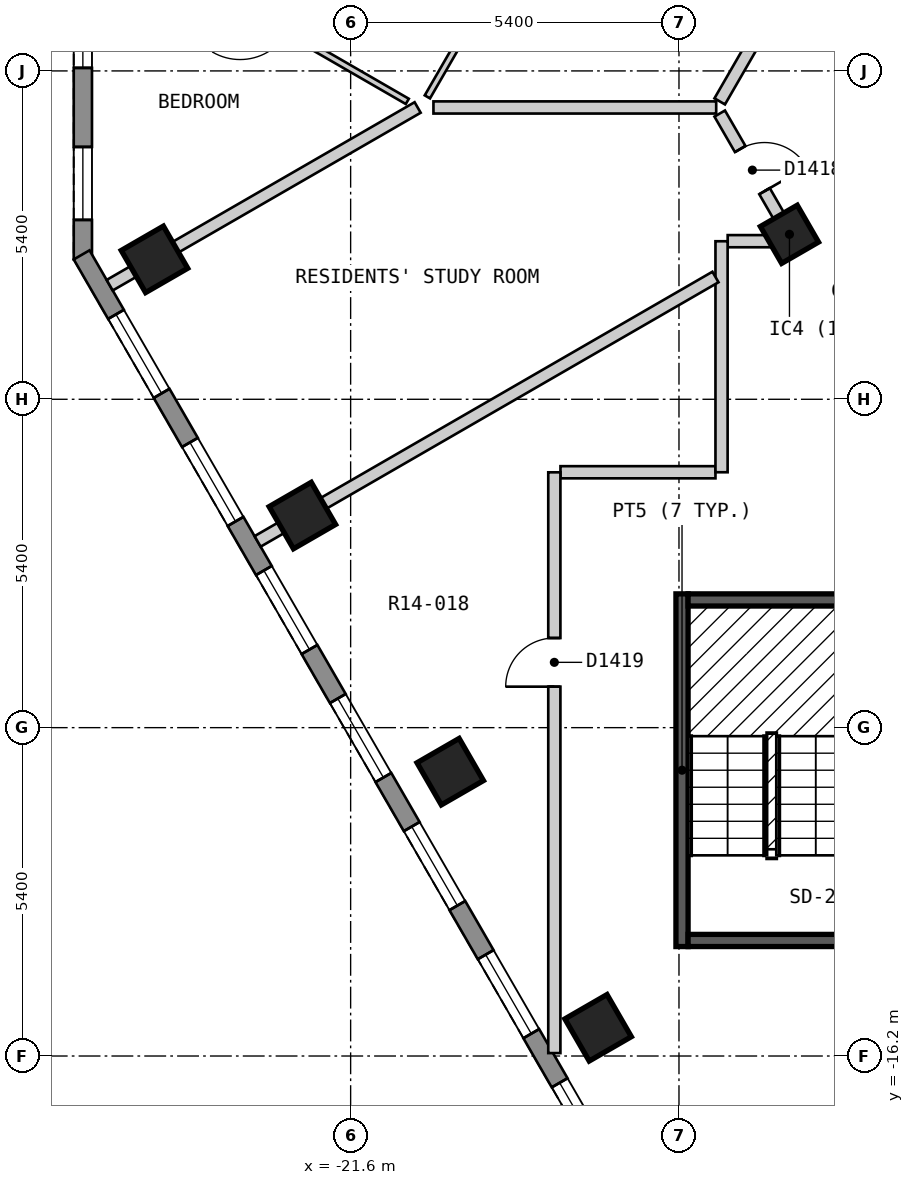
"""IFC4 building model, lengths in metres.
Left out: names, types, materials, properties, quantities, classifications, styles, units other than length and angle.
Written with IfcOpenShell. Run it as: python <this file> out.ifc"""

import sys

from ifc_helpers import new_model, si_unit, direction, frame, frame_2d, origin, origin_2d, place, context, subcontext, project, spatial, polyline, rectangle, outline, extrude, element, fill, save


model = new_model("IFC4")
c1 = context("Model", 3, precision=1e-05, world=origin(), true_north=direction((0.0, 1.0)))
c2 = subcontext(c1, "Body", "Model", "MODEL_VIEW")
j1 = project(units=[si_unit("LENGTHUNIT", "METRE"), si_unit("PLANEANGLEUNIT", "RADIAN")], contexts=[c1])
p1 = place(None, origin())
s1 = spatial("IfcSite", under=j1, at=p1, CompositionType="ELEMENT")
p2 = place(p1, origin())
s2 = spatial("IfcBuilding", under=s1, at=p2, CompositionType="ELEMENT")
p3 = place(p2, frame((0.0, 0.0, 178.2)))
s3 = spatial("IfcBuildingStorey", under=s2, at=p3, CompositionType="ELEMENT", Elevation=178.2)
for number, where, z_axis, x_axis in (
    (1, (-24.826, -3.099, 0.0), (0.0, 0.0, 1.0), (0.5, -0.866, 0.0)),
    (2, (-22.394, -7.312, 0.0), (0.0, 0.0, 1.0), (0.5, -0.866, 0.0)),
    (3, (-19.962, -11.524, 0.0), (0.0, 0.0, 1.0), (0.5, -0.866, 0.0)),
    (4, (-17.53, -15.736, 0.0), (0.0, 0.0, 1.0), (0.5, -0.866, 0.0)),
):
    element("IfcColumn", number, at=place(p3, frame(where, z_axis=z_axis, x_axis=x_axis)), inside=s3, PredefinedType="COLUMN", context=c2, shape_type="SweptSolid", body=[
        extrude(rectangle(XDim=0.8, YDim=0.8, at=origin_2d()), origin(), (0.0, 0.0, 1.0), 3.0),
    ])
p4 = place(p3, frame((-14.383, -2.687, 0.0), z_axis=(0.0, 0.0, 1.0), x_axis=(0.5, -0.866025403784, 0.0)))
e5 = element("IfcColumn", 5, at=p4, inside=s3, PredefinedType="COLUMN", context=c2, shape_type="SweptSolid", body=[
    extrude(rectangle(XDim=0.7, YDim=0.7, at=origin_2d()), origin(), (0.0, 0.0, 1.0), 3.0),
])
p5 = place(p3, frame((-26.004, 1.9, 0.0), z_axis=(0.0, 0.0, 1.0), x_axis=(0.0, -1.0, 0.0)))
e6 = element("IfcWall", 6, at=p5, inside=s3, PredefinedType="SOLIDWALL", context=c2, shape_type="SweptSolid", body=[
    extrude(outline(polyline([(0.0, -0.15), (5.0, -0.15), (4.92, 0.15), (0.08, 0.15), (0.0, -0.15)])), origin(), (0.0, 0.0, 1.0), 2.7),
])
p6 = place(p5, frame((0.65, 0.0, 0.15)))
e7 = element("IfcOpeningElement", 7, at=p6, cuts=e6, PredefinedType="OPENING", context=c2, shape_type="SweptSolid", body=[
    extrude(rectangle(XDim=1.2, YDim=2.1, at=frame_2d((0.6, 1.05))), frame((0.0, 0.16, 0.0), z_axis=(0.0, -1.0, 0.0), x_axis=(1.0, 0.0, 0.0)), (0.0, 0.0, 1.0), 0.32),
])
p7 = place(p5, frame((3.15, 0.0, 0.15)))
e8 = element("IfcOpeningElement", 8, at=p7, cuts=e6, PredefinedType="OPENING", context=c2, shape_type="SweptSolid", body=[
    extrude(rectangle(XDim=1.2, YDim=2.1, at=frame_2d((0.6, 1.05))), frame((0.0, 0.16, 0.0), z_axis=(0.0, -1.0, 0.0), x_axis=(1.0, 0.0, 0.0)), (0.0, 0.0, 1.0), 0.32),
])
p8 = place(p3, frame((-26.024, -3.025, 0.0), z_axis=(0.0, 0.0, 1.0), x_axis=(0.500018670445, -0.86601462413, 0.0)))
e9 = element("IfcWall", 9, at=p8, inside=s3, PredefinedType="SOLIDWALL", context=c2, shape_type="SweptSolid", body=[
    extrude(outline(polyline([(0.0, -0.15), (20.785, -0.15), (20.705, 0.15), (0.08, 0.15), (0.0, -0.15)])), origin(), (0.0, 0.0, 1.0), 2.7),
])
p9 = place(p8, frame((1.13, 0.0, 0.15)))
e10 = element("IfcOpeningElement", 10, at=p9, cuts=e9, PredefinedType="OPENING", context=c2, shape_type="SweptSolid", body=[
    extrude(rectangle(XDim=1.5, YDim=2.1, at=frame_2d((0.75, 1.05))), frame((0.0, 0.16, 0.0), z_axis=(0.0, -1.0, 0.0), x_axis=(1.0, 0.0, 0.0)), (0.0, 0.0, 1.0), 0.32),
])
p10 = place(p8, frame((3.562, 0.0, 0.15)))
e11 = element("IfcOpeningElement", 11, at=p10, cuts=e9, PredefinedType="OPENING", context=c2, shape_type="SweptSolid", body=[
    extrude(rectangle(XDim=1.5, YDim=2.1, at=frame_2d((0.75, 1.05))), frame((0.0, 0.16, 0.0), z_axis=(0.0, -1.0, 0.0), x_axis=(1.0, 0.0, 0.0)), (0.0, 0.0, 1.0), 0.32),
])
p11 = place(p8, frame((5.994, 0.0, 0.15)))
e12 = element("IfcOpeningElement", 12, at=p11, cuts=e9, PredefinedType="OPENING", context=c2, shape_type="SweptSolid", body=[
    extrude(rectangle(XDim=1.5, YDim=2.1, at=frame_2d((0.75, 1.05))), frame((0.0, 0.16, 0.0), z_axis=(0.0, -1.0, 0.0), x_axis=(1.0, 0.0, 0.0)), (0.0, 0.0, 1.0), 0.32),
])
p12 = place(p8, frame((8.425, 0.0, 0.15)))
e13 = element("IfcOpeningElement", 13, at=p12, cuts=e9, PredefinedType="OPENING", context=c2, shape_type="SweptSolid", body=[
    extrude(rectangle(XDim=1.5, YDim=2.1, at=frame_2d((0.75, 1.05))), frame((0.0, 0.16, 0.0), z_axis=(0.0, -1.0, 0.0), x_axis=(1.0, 0.0, 0.0)), (0.0, 0.0, 1.0), 0.32),
])
p13 = place(p8, frame((10.857, 0.0, 0.15)))
e14 = element("IfcOpeningElement", 14, at=p13, cuts=e9, PredefinedType="OPENING", context=c2, shape_type="SweptSolid", body=[
    extrude(rectangle(XDim=1.5, YDim=2.1, at=frame_2d((0.75, 1.05))), frame((0.0, 0.16, 0.0), z_axis=(0.0, -1.0, 0.0), x_axis=(1.0, 0.0, 0.0)), (0.0, 0.0, 1.0), 0.32),
])
p14 = place(p8, frame((13.289, 0.0, 0.15)))
e15 = element("IfcOpeningElement", 15, at=p14, cuts=e9, PredefinedType="OPENING", context=c2, shape_type="SweptSolid", body=[
    extrude(rectangle(XDim=1.5, YDim=2.1, at=frame_2d((0.75, 1.05))), frame((0.0, 0.16, 0.0), z_axis=(0.0, -1.0, 0.0), x_axis=(1.0, 0.0, 0.0)), (0.0, 0.0, 1.0), 0.32),
])
p15 = place(p8, frame((15.722, 0.0, 0.15)))
e16 = element("IfcOpeningElement", 16, at=p15, cuts=e9, PredefinedType="OPENING", context=c2, shape_type="SweptSolid", body=[
    extrude(rectangle(XDim=1.5, YDim=2.1, at=frame_2d((0.75, 1.05))), frame((0.0, 0.16, 0.0), z_axis=(0.0, -1.0, 0.0), x_axis=(1.0, 0.0, 0.0)), (0.0, 0.0, 1.0), 0.32),
])
p16 = place(p8, frame((18.154, 0.0, 0.15)))
e17 = element("IfcOpeningElement", 17, at=p16, cuts=e9, PredefinedType="OPENING", context=c2, shape_type="SweptSolid", body=[
    extrude(rectangle(XDim=1.5, YDim=2.1, at=frame_2d((0.75, 1.05))), frame((0.0, 0.16, 0.0), z_axis=(0.0, -1.0, 0.0), x_axis=(1.0, 0.0, 0.0)), (0.0, 0.0, 1.0), 0.32),
])
p17 = place(p3, frame((-15.53, -0.701, 0.0), z_axis=(0.0, 0.0, 1.0), x_axis=(0.499972710878, -0.866041158593, 0.0)))
e18 = element("IfcWall", 18, at=p17, inside=s3, PredefinedType="PARTITIONING", context=c2, shape_type="SweptSolid", body=[
    extrude(rectangle(XDim=2.308, YDim=0.2, at=frame_2d((1.154, 0.0))), origin(), (0.0, 0.0, 1.0), 2.7),
])
p18 = place(p17, frame((0.674, 0.0, 0.0)))
e19 = element("IfcOpeningElement", 19, at=p18, cuts=e18, PredefinedType="OPENING", context=c2, shape_type="SweptSolid", body=[
    extrude(rectangle(XDim=0.8, YDim=2.1, at=frame_2d((0.4, 1.05))), frame((0.0, 0.11, 0.0), z_axis=(0.0, -1.0, 0.0), x_axis=(1.0, 0.0, 0.0)), (0.0, 0.0, 1.0), 0.22),
])
p19 = place(p3, frame((-18.149, -6.6, 0.0), z_axis=(0.0, 0.0, 1.0), x_axis=(1.0, 0.0, 0.0)))
e20 = element("IfcWall", 20, at=p19, inside=s3, PredefinedType="PARTITIONING", context=c2, shape_type="SweptSolid", body=[
    extrude(rectangle(XDim=2.549, YDim=0.2, at=frame_2d((1.274, 0.0))), origin(), (0.0, 0.0, 1.0), 2.7),
])
p20 = place(p3, frame((-15.399, -2.8, 0.0), z_axis=(0.0, 0.0, 1.0), x_axis=(1.0, 0.0, 0.0)))
e21 = element("IfcWall", 21, at=p20, inside=s3, PredefinedType="PARTITIONING", context=c2, shape_type="SweptSolid", body=[
    extrude(rectangle(XDim=1.081, YDim=0.2, at=frame_2d((0.541, 0.0))), origin(), (0.0, 0.0, 1.0), 2.7),
])
p21 = place(p3, frame((-15.53, -0.501, 0.0), z_axis=(0.0, 0.0, 1.0), x_axis=(0.499952498232, 0.866052827206, 0.0)))
e22 = element("IfcWall", 22, at=p21, inside=s3, PredefinedType="PARTITIONING", context=c2, shape_type="SweptSolid", body=[
    extrude(rectangle(XDim=9.585, YDim=0.2, at=frame_2d((4.792, 0.0))), origin(), (0.0, 0.0, 1.0), 2.7),
])
p22 = place(p3, frame((-15.5, -6.6, 0.0), z_axis=(0.0, 0.0, 1.0), x_axis=(0.0, 1.0, 0.0)))
e23 = element("IfcWall", 23, at=p22, inside=s3, PredefinedType="PARTITIONING", context=c2, shape_type="SweptSolid", body=[
    extrude(rectangle(XDim=3.799, YDim=0.2, at=frame_2d((1.899, 0.0))), origin(), (0.0, 0.0, 1.0), 2.7),
])
p23 = place(p3, frame((-18.25, -16.152, 0.0), z_axis=(0.0, 0.0, 1.0), x_axis=(0.0, 1.0, 0.0)))
e24 = element("IfcWall", 24, at=p23, inside=s3, PredefinedType="PARTITIONING", context=c2, shape_type="SweptSolid", body=[
    extrude(rectangle(XDim=9.551, YDim=0.2, at=frame_2d((4.775, 0.0))), origin(), (0.0, 0.0, 1.0), 2.7),
])
p24 = place(p23, frame((6.026, 0.0, 0.0)))
e25 = element("IfcOpeningElement", 25, at=p24, cuts=e24, PredefinedType="OPENING", context=c2, shape_type="SweptSolid", body=[
    extrude(rectangle(XDim=0.8, YDim=2.1, at=frame_2d((0.4, 1.05))), frame((0.0, 0.11, 0.0), z_axis=(0.0, -1.0, 0.0), x_axis=(1.0, 0.0, 0.0)), (0.0, 0.0, 1.0), 0.22),
])
p25 = place(p3, frame((-25.562, 2.325, 0.0), z_axis=(0.0, 0.0, 1.0), x_axis=(0.865998530728, -0.500046542611, 0.0)))
e26 = element("IfcWall", 26, at=p25, inside=s3, PredefinedType="PARTITIONING", context=c2, shape_type="SweptSolid", body=[
    extrude(rectangle(XDim=5.651, YDim=0.1, at=frame_2d((2.826, 0.0))), origin(), (0.0, 0.0, 1.0), 2.7),
])
p26 = place(p25, frame((2.476, 0.0, 0.0)))
e27 = element("IfcOpeningElement", 27, at=p26, cuts=e26, PredefinedType="OPENING", context=c2, shape_type="SweptSolid", body=[
    extrude(rectangle(XDim=0.9, YDim=2.1, at=frame_2d((0.45, 1.05))), frame((0.0, 0.06, 0.0), z_axis=(0.0, -1.0, 0.0), x_axis=(1.0, 0.0, 0.0)), (0.0, 0.0, 1.0), 0.12),
])
p27 = place(p3, frame((-20.338, -0.427, 0.0), z_axis=(0.0, 0.0, 1.0), x_axis=(0.500069990121, 0.865984991198, 0.0)))
e28 = element("IfcWall", 28, at=p27, inside=s3, PredefinedType="PARTITIONING", context=c2, shape_type="SweptSolid", body=[
    extrude(rectangle(XDim=1.176, YDim=0.1, at=frame_2d((0.588, 0.0))), origin(), (0.0, 0.0, 1.0), 2.7),
])
p28 = place(p3, frame((-20.238, -0.601, 0.0), z_axis=(0.0, 0.0, 1.0), x_axis=(1.0, 0.0, 0.0)))
e29 = element("IfcWall", 29, at=p28, inside=s3, PredefinedType="PARTITIONING", context=c2, shape_type="SweptSolid", body=[
    extrude(rectangle(XDim=4.65, YDim=0.2, at=frame_2d((2.325, 0.0))), origin(), (0.0, 0.0, 1.0), 2.7),
])
p29 = place(p3, frame((-23.13, -7.737, 0.0), z_axis=(0.0, 0.0, 1.0), x_axis=(0.86598451299, 0.500070818246, 0.0)))
e30 = element("IfcWall", 30, at=p29, inside=s3, PredefinedType="PARTITIONING", context=c2, shape_type="SweptSolid", body=[
    extrude(rectangle(XDim=8.695, YDim=0.2, at=frame_2d((4.348, 0.0))), origin(), (0.0, 0.0, 1.0), 2.7),
])
p30 = place(p3, frame((-25.563, -3.524, 0.0), z_axis=(0.0, 0.0, 1.0), x_axis=(0.866128586522, 0.499821239653, 0.0)))
e31 = element("IfcWall", 31, at=p30, inside=s3, PredefinedType="PARTITIONING", context=c2, shape_type="SweptSolid", body=[
    extrude(rectangle(XDim=5.848, YDim=0.2, at=frame_2d((2.924, 0.0))), origin(), (0.0, 0.0, 1.0), 2.7),
])
p31 = place(p3, frame((-16.15, -14.4, 0.0), z_axis=(0.0, 0.0, 1.0), x_axis=(0.0, 1.0, 0.0)))
e32 = element("IfcWall", 32, at=p31, inside=s3, PredefinedType="SOLIDWALL", context=c2, shape_type="SweptSolid", body=[
    extrude(rectangle(XDim=5.8, YDim=0.2, at=frame_2d((2.9, 0.0))), origin(), (0.0, 0.0, 1.0), 2.7),
])
for number, where, z_axis, x_axis in (
    (33, (-16.05, -14.3, 0.0), (0.0, 0.0, 1.0), (1.0, 0.0, 0.0)),
    (34, (-16.05, -8.7, 0.0), (0.0, 0.0, 1.0), (1.0, 0.0, 0.0)),
):
    element("IfcWall", number, at=place(p3, frame(where, z_axis=z_axis, x_axis=x_axis)), inside=s3, PredefinedType="SOLIDWALL", context=c2, shape_type="SweptSolid", body=[
        extrude(rectangle(XDim=2.75, YDim=0.2, at=frame_2d((1.375, 0.0))), origin(), (0.0, 0.0, 1.0), 2.7),
    ])
p32 = place(p6, origin())
e35 = element("IfcWindow", 35, at=p32, inside=s3, PartitioningType="SINGLE_PANEL", PredefinedType="WINDOW", context=c2, shape_type="SweptSolid", body=[
    extrude(rectangle(XDim=1.2, YDim=2.1, at=frame_2d((0.6, 1.05))), frame((0.0, 0.03, 0.0), z_axis=(0.0, -1.0, 0.0), x_axis=(1.0, 0.0, 0.0)), (0.0, 0.0, 1.0), 0.06),
])
fill(e7, e35)
p33 = place(p7, origin())
e36 = element("IfcWindow", 36, at=p33, inside=s3, PartitioningType="SINGLE_PANEL", PredefinedType="WINDOW", context=c2, shape_type="SweptSolid", body=[
    extrude(rectangle(XDim=1.2, YDim=2.1, at=frame_2d((0.6, 1.05))), frame((0.0, 0.03, 0.0), z_axis=(0.0, -1.0, 0.0), x_axis=(1.0, 0.0, 0.0)), (0.0, 0.0, 1.0), 0.06),
])
fill(e8, e36)
p34 = place(p9, origin())
e37 = element("IfcWindow", 37, at=p34, inside=s3, PartitioningType="SINGLE_PANEL", PredefinedType="WINDOW", context=c2, shape_type="SweptSolid", body=[
    extrude(rectangle(XDim=1.5, YDim=2.1, at=frame_2d((0.75, 1.05))), frame((0.0, 0.03, 0.0), z_axis=(0.0, -1.0, 0.0), x_axis=(1.0, 0.0, 0.0)), (0.0, 0.0, 1.0), 0.06),
])
fill(e10, e37)
p35 = place(p10, origin())
e38 = element("IfcWindow", 38, at=p35, inside=s3, PartitioningType="SINGLE_PANEL", PredefinedType="WINDOW", context=c2, shape_type="SweptSolid", body=[
    extrude(rectangle(XDim=1.5, YDim=2.1, at=frame_2d((0.75, 1.05))), frame((0.0, 0.03, 0.0), z_axis=(0.0, -1.0, 0.0), x_axis=(1.0, 0.0, 0.0)), (0.0, 0.0, 1.0), 0.06),
])
fill(e11, e38)
p36 = place(p11, origin())
e39 = element("IfcWindow", 39, at=p36, inside=s3, PartitioningType="SINGLE_PANEL", PredefinedType="WINDOW", context=c2, shape_type="SweptSolid", body=[
    extrude(rectangle(XDim=1.5, YDim=2.1, at=frame_2d((0.75, 1.05))), frame((0.0, 0.03, 0.0), z_axis=(0.0, -1.0, 0.0), x_axis=(1.0, 0.0, 0.0)), (0.0, 0.0, 1.0), 0.06),
])
fill(e12, e39)
p37 = place(p12, origin())
e40 = element("IfcWindow", 40, at=p37, inside=s3, PartitioningType="SINGLE_PANEL", PredefinedType="WINDOW", context=c2, shape_type="SweptSolid", body=[
    extrude(rectangle(XDim=1.5, YDim=2.1, at=frame_2d((0.75, 1.05))), frame((0.0, 0.03, 0.0), z_axis=(0.0, -1.0, 0.0), x_axis=(1.0, 0.0, 0.0)), (0.0, 0.0, 1.0), 0.06),
])
fill(e13, e40)
p38 = place(p13, origin())
e41 = element("IfcWindow", 41, at=p38, inside=s3, PartitioningType="SINGLE_PANEL", PredefinedType="WINDOW", context=c2, shape_type="SweptSolid", body=[
    extrude(rectangle(XDim=1.5, YDim=2.1, at=frame_2d((0.75, 1.05))), frame((0.0, 0.03, 0.0), z_axis=(0.0, -1.0, 0.0), x_axis=(1.0, 0.0, 0.0)), (0.0, 0.0, 1.0), 0.06),
])
fill(e14, e41)
p39 = place(p14, origin())
e42 = element("IfcWindow", 42, at=p39, inside=s3, PartitioningType="SINGLE_PANEL", PredefinedType="WINDOW", context=c2, shape_type="SweptSolid", body=[
    extrude(rectangle(XDim=1.5, YDim=2.1, at=frame_2d((0.75, 1.05))), frame((0.0, 0.03, 0.0), z_axis=(0.0, -1.0, 0.0), x_axis=(1.0, 0.0, 0.0)), (0.0, 0.0, 1.0), 0.06),
])
fill(e15, e42)
p40 = place(p15, origin())
e43 = element("IfcWindow", 43, at=p40, inside=s3, PartitioningType="SINGLE_PANEL", PredefinedType="WINDOW", context=c2, shape_type="SweptSolid", body=[
    extrude(rectangle(XDim=1.5, YDim=2.1, at=frame_2d((0.75, 1.05))), frame((0.0, 0.03, 0.0), z_axis=(0.0, -1.0, 0.0), x_axis=(1.0, 0.0, 0.0)), (0.0, 0.0, 1.0), 0.06),
])
fill(e16, e43)
p41 = place(p18, origin())
e44 = element("IfcDoor", 44, at=p41, inside=s3, OperationType="SINGLE_SWING_RIGHT", PredefinedType="DOOR", context=c2, shape_type="SweptSolid", body=[
    extrude(rectangle(XDim=0.8, YDim=2.1, at=frame_2d((0.4, 1.05))), frame((0.0, 0.025, 0.0), z_axis=(0.0, -1.0, 0.0), x_axis=(1.0, 0.0, 0.0)), (0.0, 0.0, 1.0), 0.05),
])
fill(e19, e44)
p42 = place(p24, origin())
e45 = element("IfcDoor", 45, at=p42, inside=s3, OperationType="SINGLE_SWING_LEFT", PredefinedType="DOOR", context=c2, shape_type="SweptSolid", body=[
    extrude(rectangle(XDim=0.8, YDim=2.1, at=frame_2d((0.4, 1.05))), frame((0.0, 0.025, 0.0), z_axis=(0.0, -1.0, 0.0), x_axis=(1.0, 0.0, 0.0)), (0.0, 0.0, 1.0), 0.05),
])
fill(e25, e45)
save(model, sys.argv[1])
